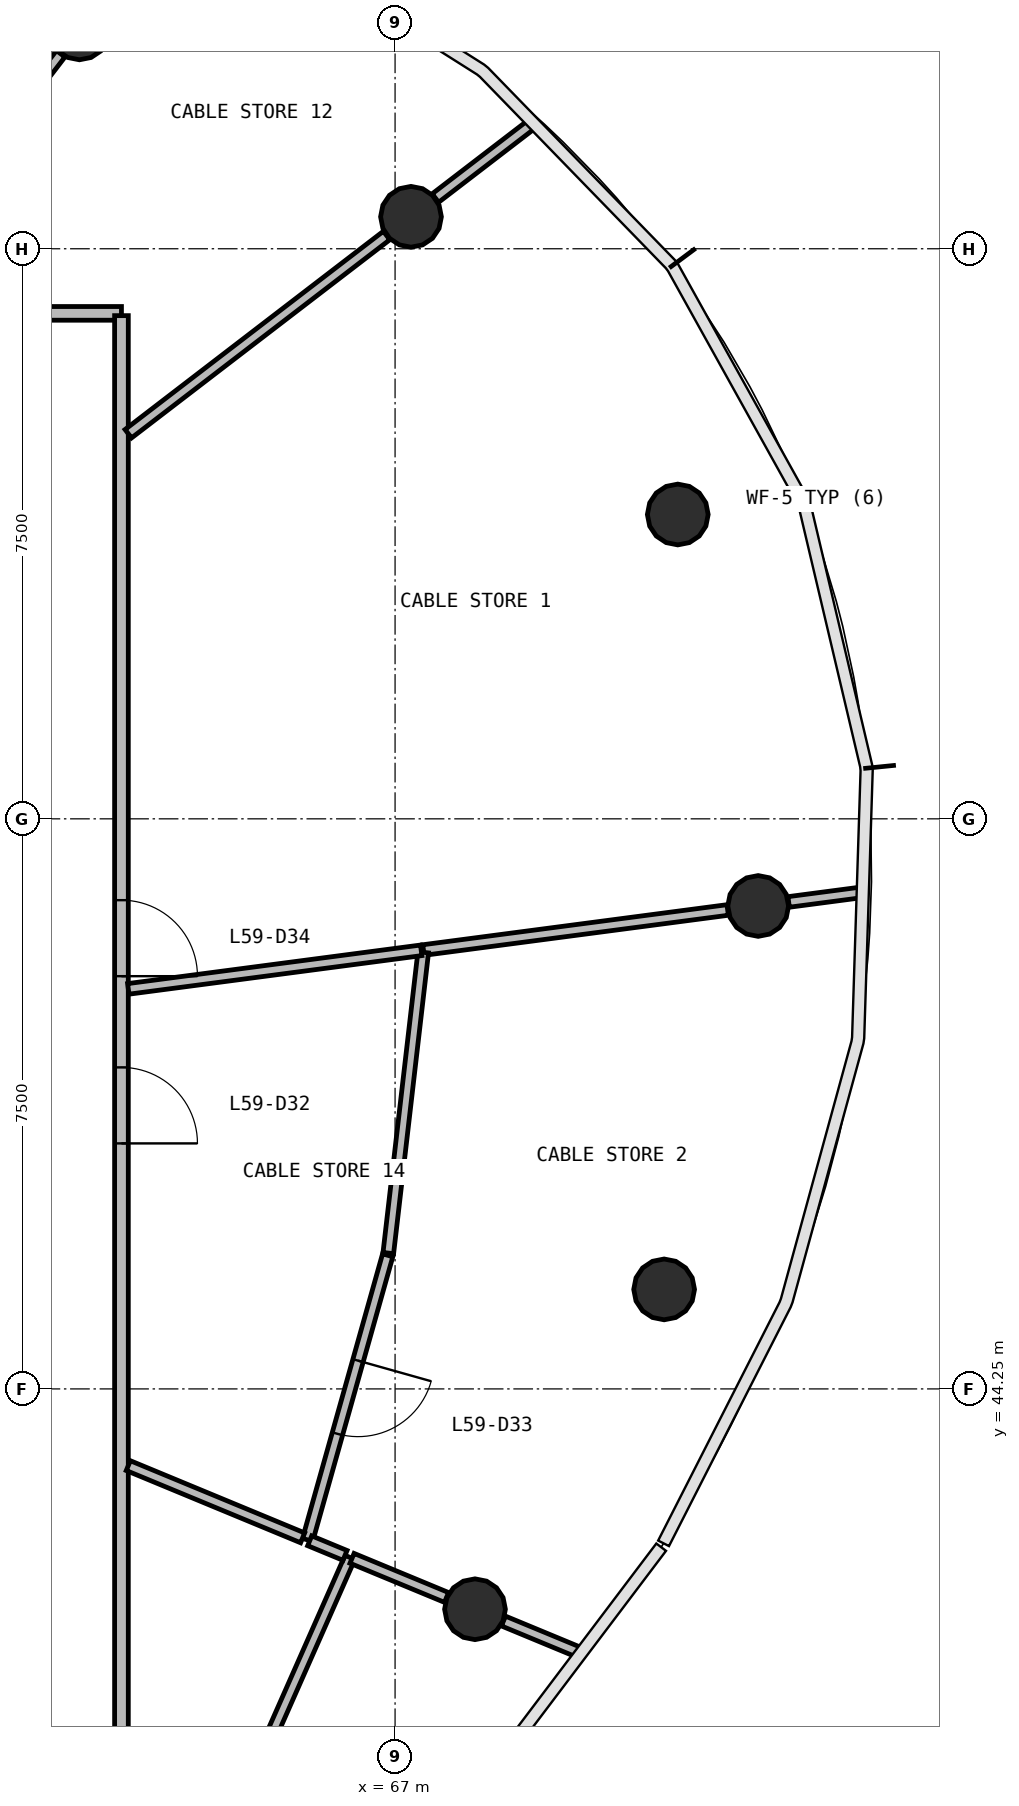
"""IFC4 building model, lengths in metres.
Left out: names, types, materials, properties, quantities, classifications, styles, units other than length and angle.
Written with IfcOpenShell. Run it as: python <this file> out.ifc"""

import sys

from ifc_helpers import new_model, si_unit, direction, frame, frame_2d, origin, origin_2d, place, context, subcontext, project, spatial, rectangle, circle, extrude, source, transform, mapped, element, fill, save


model = new_model("IFC4")
c1 = context("Model", 3, precision=1e-05, world=origin(), true_north=direction((0.0, 1.0)))
c2 = subcontext(c1, "Body", "Model", "MODEL_VIEW")
j1 = project(units=[si_unit("LENGTHUNIT", "METRE"), si_unit("PLANEANGLEUNIT", "RADIAN")], contexts=[c1])
p1 = place(None, origin())
s1 = spatial("IfcSite", under=j1, at=p1, CompositionType="ELEMENT")
p2 = place(p1, origin())
s2 = spatial("IfcBuilding", under=s1, at=p2, CompositionType="ELEMENT")
p3 = place(p2, frame((0.0, 0.0, 242.3)))
s3 = spatial("IfcBuildingStorey", under=s2, at=p3, CompositionType="ELEMENT", Elevation=242.3)
m1 = source(origin(), c2, "Body", "SweptSolid", [
    extrude(circle(Radius=0.4, at=origin_2d()), origin(), (0.0, 0.0, 1.0), 3.9),
])
for number, where, z_axis, x_axis in (
    (1, (71.777, 50.604, 0.0), (0.0, 0.0, 1.0), (1.0, 0.0, 0.0)),
    (2, (70.719, 55.754, 0.0), (0.0, 0.0, 1.0), (1.0, 0.0, 0.0)),
    (3, (67.209, 59.671, 0.0), (0.0, 0.0, 1.0), (1.0, 0.0, 0.0)),
    (4, (62.847, 62.136, 0.0), (0.0, 0.0, 1.0), (1.0, 0.0, 0.0)),
    (5, (68.052, 41.351, 0.0), (0.0, 0.0, 1.0), (1.0, 0.0, 0.0)),
    (6, (70.54, 45.559, 0.0), (0.0, 0.0, 1.0), (1.0, 0.0, 0.0)),
):
    element("IfcColumn", number, at=place(p3, frame(where, z_axis=z_axis, x_axis=x_axis)), inside=s3, PredefinedType="COLUMN", context=c2, shape_type="MappedRepresentation", body=[
        mapped(m1, transform((0.0, 0.0, 0.0), scale=1.0)),
    ])
p4 = place(p3, frame((40.6, 58.4, 0.0), z_axis=(0.0, 0.0, 1.0), x_axis=(1.0, 0.0, 0.0)))
e7 = element("IfcWall", 7, at=p4, inside=s3, PredefinedType="PARTITIONING", context=c2, shape_type="SweptSolid", body=[
    extrude(rectangle(XDim=22.8, YDim=0.18, at=frame_2d((11.4, 0.0))), origin(), (0.0, 0.0, 1.0), 2.88),
])
p5 = place(p4, frame((10.85, 0.0, 0.0)))
e8 = element("IfcOpeningElement", 8, at=p5, cuts=e7, PredefinedType="OPENING", context=c2, shape_type="SweptSolid", body=[
    extrude(rectangle(XDim=0.9, YDim=2.1, at=frame_2d((0.45, 1.05))), frame((0.0, 0.1, 0.0), z_axis=(0.0, -1.0, 0.0), x_axis=(1.0, 0.0, 0.0)), (0.0, 0.0, 1.0), 0.2),
])
p6 = place(p4, frame((8.85, 0.0, 0.0)))
e9 = element("IfcOpeningElement", 9, at=p6, cuts=e7, PredefinedType="OPENING", context=c2, shape_type="SweptSolid", body=[
    extrude(rectangle(XDim=0.9, YDim=2.1, at=frame_2d((0.45, 1.05))), frame((0.0, 0.1, 0.0), z_axis=(0.0, -1.0, 0.0), x_axis=(1.0, 0.0, 0.0)), (0.0, 0.0, 1.0), 0.2),
])
p7 = place(p4, frame((5.75, 0.0, 0.0)))
e10 = element("IfcOpeningElement", 10, at=p7, cuts=e7, PredefinedType="OPENING", context=c2, shape_type="SweptSolid", body=[
    extrude(rectangle(XDim=1.0, YDim=2.1, at=frame_2d((0.5, 1.05))), frame((0.0, 0.1, 0.0), z_axis=(0.0, -1.0, 0.0), x_axis=(1.0, 0.0, 0.0)), (0.0, 0.0, 1.0), 0.2),
])
p8 = place(p4, frame((19.95, 0.0, 0.0)))
e11 = element("IfcOpeningElement", 11, at=p8, cuts=e7, PredefinedType="OPENING", context=c2, shape_type="SweptSolid", body=[
    extrude(rectangle(XDim=1.0, YDim=2.1, at=frame_2d((0.5, 1.05))), frame((0.0, 0.1, 0.0), z_axis=(0.0, -1.0, 0.0), x_axis=(1.0, 0.0, 0.0)), (0.0, 0.0, 1.0), 0.2),
])
p9 = place(p4, frame((12.95, 0.0, 0.0)))
e12 = element("IfcOpeningElement", 12, at=p9, cuts=e7, PredefinedType="OPENING", context=c2, shape_type="SweptSolid", body=[
    extrude(rectangle(XDim=1.0, YDim=2.1, at=frame_2d((0.5, 1.05))), frame((0.0, 0.1, 0.0), z_axis=(0.0, -1.0, 0.0), x_axis=(1.0, 0.0, 0.0)), (0.0, 0.0, 1.0), 0.2),
])
p10 = place(p3, frame((63.4, 58.37, 0.0), z_axis=(0.0, 0.0, 1.0), x_axis=(0.0, -1.0, 0.0)))
e13 = element("IfcWall", 13, at=p10, inside=s3, PredefinedType="PARTITIONING", context=c2, shape_type="SweptSolid", body=[
    extrude(rectangle(XDim=20.74, YDim=0.18, at=frame_2d((10.37, 0.0))), origin(), (0.0, 0.0, 1.0), 2.88),
])
p11 = place(p10, frame((9.89, 0.0, 0.0)))
e14 = element("IfcOpeningElement", 14, at=p11, cuts=e13, PredefinedType="OPENING", context=c2, shape_type="SweptSolid", body=[
    extrude(rectangle(XDim=1.0, YDim=2.1, at=frame_2d((0.5, 1.05))), frame((0.0, 0.1, 0.0), z_axis=(0.0, -1.0, 0.0), x_axis=(1.0, 0.0, 0.0)), (0.0, 0.0, 1.0), 0.2),
])
p12 = place(p10, frame((7.69, 0.0, 0.0)))
e15 = element("IfcOpeningElement", 15, at=p12, cuts=e13, PredefinedType="OPENING", context=c2, shape_type="SweptSolid", body=[
    extrude(rectangle(XDim=1.0, YDim=2.1, at=frame_2d((0.5, 1.05))), frame((0.0, 0.1, 0.0), z_axis=(0.0, -1.0, 0.0), x_axis=(1.0, 0.0, 0.0)), (0.0, 0.0, 1.0), 0.2),
])
p13 = place(p3, frame((63.49, 56.817, 0.0), z_axis=(0.0, 0.0, 1.0), x_axis=(0.793358616255, 0.608754553177, 0.0)))
e16 = element("IfcWall", 16, at=p13, inside=s3, PredefinedType="PARTITIONING", context=c2, shape_type="SweptSolid", body=[
    extrude(rectangle(XDim=4.284, YDim=0.14, at=frame_2d((2.142, 0.0))), origin(), (0.0, 0.0, 1.0), 2.88),
])
p14 = place(p3, frame((60.049, 58.49, 0.0), z_axis=(0.0, 0.0, 1.0), x_axis=(0.60875313342, 0.793359705651, 0.0)))
e17 = element("IfcWall", 17, at=p14, inside=s3, PredefinedType="PARTITIONING", context=c2, shape_type="SweptSolid", body=[
    extrude(rectangle(XDim=4.191, YDim=0.14, at=frame_2d((2.095, 0.0))), origin(), (0.0, 0.0, 1.0), 2.88),
])
p15 = place(p3, frame((67.374, 50.024, 0.0), z_axis=(0.0, 0.0, 1.0), x_axis=(0.991448325459, 0.130499877179, 0.0)))
e18 = element("IfcWall", 18, at=p15, inside=s3, PredefinedType="PARTITIONING", context=c2, shape_type="SweptSolid", body=[
    extrude(rectangle(XDim=4.037, YDim=0.14, at=frame_2d((2.019, 0.0))), origin(), (0.0, 0.0, 1.0), 2.88),
])
p16 = place(p3, frame((66.911, 46.037, 0.0), z_axis=(0.0, 0.0, 1.0), x_axis=(0.115273055571, 0.993333842502, 0.0)))
e19 = element("IfcWall", 19, at=p16, inside=s3, PredefinedType="PARTITIONING", context=c2, shape_type="SweptSolid", body=[
    extrude(rectangle(XDim=3.984, YDim=0.14, at=frame_2d((1.992, 0.0))), origin(), (0.0, 0.0, 1.0), 2.88),
])
p17 = place(p3, frame((63.49, 49.513, 0.0), z_axis=(0.0, 0.0, 1.0), x_axis=(0.991447025843, 0.130509750393, 0.0)))
e20 = element("IfcWall", 20, at=p17, inside=s3, PredefinedType="PARTITIONING", context=c2, shape_type="SweptSolid", body=[
    extrude(rectangle(XDim=3.887, YDim=0.14, at=frame_2d((1.944, 0.0))), origin(), (0.0, 0.0, 1.0), 2.88),
])
p18 = place(p3, frame((64.819, 38.442, 0.0), z_axis=(0.0, 0.0, 1.0), x_axis=(0.404296947446, 0.914627781278, 0.0)))
e21 = element("IfcWall", 21, at=p18, inside=s3, PredefinedType="PARTITIONING", context=c2, shape_type="SweptSolid", body=[
    extrude(rectangle(XDim=3.926, YDim=0.14, at=frame_2d((1.963, 0.0))), origin(), (0.0, 0.0, 1.0), 2.88),
])
p19 = place(p3, frame((66.903, 46.008, 0.0), z_axis=(0.0, 0.0, 1.0), x_axis=(-0.270889164169, -0.962610544684, 0.0)))
e22 = element("IfcWall", 22, at=p19, inside=s3, PredefinedType="PARTITIONING", context=c2, shape_type="SweptSolid", body=[
    extrude(rectangle(XDim=3.89, YDim=0.14, at=frame_2d((1.945, 0.0))), origin(), (0.0, 0.0, 1.0), 2.88),
])
p20 = place(p19, frame((1.44, 0.0, 0.0)))
e23 = element("IfcOpeningElement", 23, at=p20, cuts=e22, PredefinedType="OPENING", context=c2, shape_type="SweptSolid", body=[
    extrude(rectangle(XDim=1.0, YDim=2.1, at=frame_2d((0.5, 1.05))), frame((0.0, 0.08, 0.0), z_axis=(0.0, -1.0, 0.0), x_axis=(1.0, 0.0, 0.0)), (0.0, 0.0, 1.0), 0.16),
])
p21 = place(p3, frame((63.49, 43.241, 0.0), z_axis=(0.0, 0.0, 1.0), x_axis=(0.923877816288, -0.38268757567, 0.0)))
e24 = element("IfcWall", 24, at=p21, inside=s3, PredefinedType="PARTITIONING", context=c2, shape_type="SweptSolid", body=[
    extrude(rectangle(XDim=2.483, YDim=0.14, at=frame_2d((1.241, 0.0))), origin(), (0.0, 0.0, 1.0), 2.88),
])
p22 = place(p3, frame((67.531, 59.917, 0.0), z_axis=(0.0, 0.0, 1.0), x_axis=(0.793355628453, 0.608758447006, 0.0)))
e25 = element("IfcWall", 25, at=p22, inside=s3, PredefinedType="PARTITIONING", context=c2, shape_type="SweptSolid", body=[
    extrude(rectangle(XDim=1.599, YDim=0.14, at=frame_2d((0.799, 0.0))), origin(), (0.0, 0.0, 1.0), 2.88),
])
p23 = place(p3, frame((66.434, 42.021, 0.0), z_axis=(0.0, 0.0, 1.0), x_axis=(0.923815650645, -0.382837620438, 0.0)))
e26 = element("IfcWall", 26, at=p23, inside=s3, PredefinedType="PARTITIONING", context=c2, shape_type="SweptSolid", body=[
    extrude(rectangle(XDim=1.346, YDim=0.14, at=frame_2d((0.673, 0.0))), origin(), (0.0, 0.0, 1.0), 2.88),
])
p24 = place(p3, frame((68.426, 41.196, 0.0), z_axis=(0.0, 0.0, 1.0), x_axis=(0.923799341262, -0.382876973823, 0.0)))
e27 = element("IfcWall", 27, at=p24, inside=s3, PredefinedType="PARTITIONING", context=c2, shape_type="SweptSolid", body=[
    extrude(rectangle(XDim=1.067, YDim=0.14, at=frame_2d((0.534, 0.0))), origin(), (0.0, 0.0, 1.0), 2.88),
])
p25 = place(p3, frame((72.178, 50.656, 0.0), z_axis=(0.0, 0.0, 1.0), x_axis=(0.991428116695, 0.130653317704, 0.0)))
e28 = element("IfcWall", 28, at=p25, inside=s3, PredefinedType="PARTITIONING", context=c2, shape_type="SweptSolid", body=[
    extrude(rectangle(XDim=0.985, YDim=0.14, at=frame_2d((0.492, 0.0))), origin(), (0.0, 0.0, 1.0), 2.88),
])
p26 = place(p3, frame((65.877, 42.252, 0.0), z_axis=(0.0, 0.0, 1.0), x_axis=(0.92392216698, -0.382580487431, 0.0)))
e29 = element("IfcWall", 29, at=p26, inside=s3, PredefinedType="PARTITIONING", context=c2, shape_type="SweptSolid", body=[
    extrude(rectangle(XDim=0.503, YDim=0.14, at=frame_2d((0.251, 0.0))), origin(), (0.0, 0.0, 1.0), 2.88),
])
m2 = source(origin(), c2, "Body", "SweptSolid", [
    extrude(rectangle(XDim=1.0, YDim=2.1, at=frame_2d((0.5, 1.05))), frame((0.0, 0.025, 0.0), z_axis=(0.0, -1.0, 0.0), x_axis=(1.0, 0.0, 0.0)), (0.0, 0.0, 1.0), 0.05),
])
p27 = place(p11, origin())
e30 = element("IfcDoor", 30, at=p27, inside=s3, OperationType="SINGLE_SWING_RIGHT", PredefinedType="DOOR", context=c2, shape_type="MappedRepresentation", body=[
    mapped(m2, transform((0.0, 0.0, 0.0), scale=1.0)),
])
fill(e14, e30)
p28 = place(p20, origin())
e31 = element("IfcDoor", 31, at=p28, inside=s3, OperationType="SINGLE_SWING_LEFT", PredefinedType="DOOR", context=c2, shape_type="MappedRepresentation", body=[
    mapped(m2, transform((0.0, 0.0, 0.0), scale=1.0)),
])
fill(e23, e31)
p29 = place(p12, origin())
e32 = element("IfcDoor", 32, at=p29, inside=s3, OperationType="SINGLE_SWING_RIGHT", PredefinedType="DOOR", context=c2, shape_type="MappedRepresentation", body=[
    mapped(m2, transform((0.0, 0.0, 0.0), scale=1.0)),
])
fill(e15, e32)
save(model, sys.argv[1])
